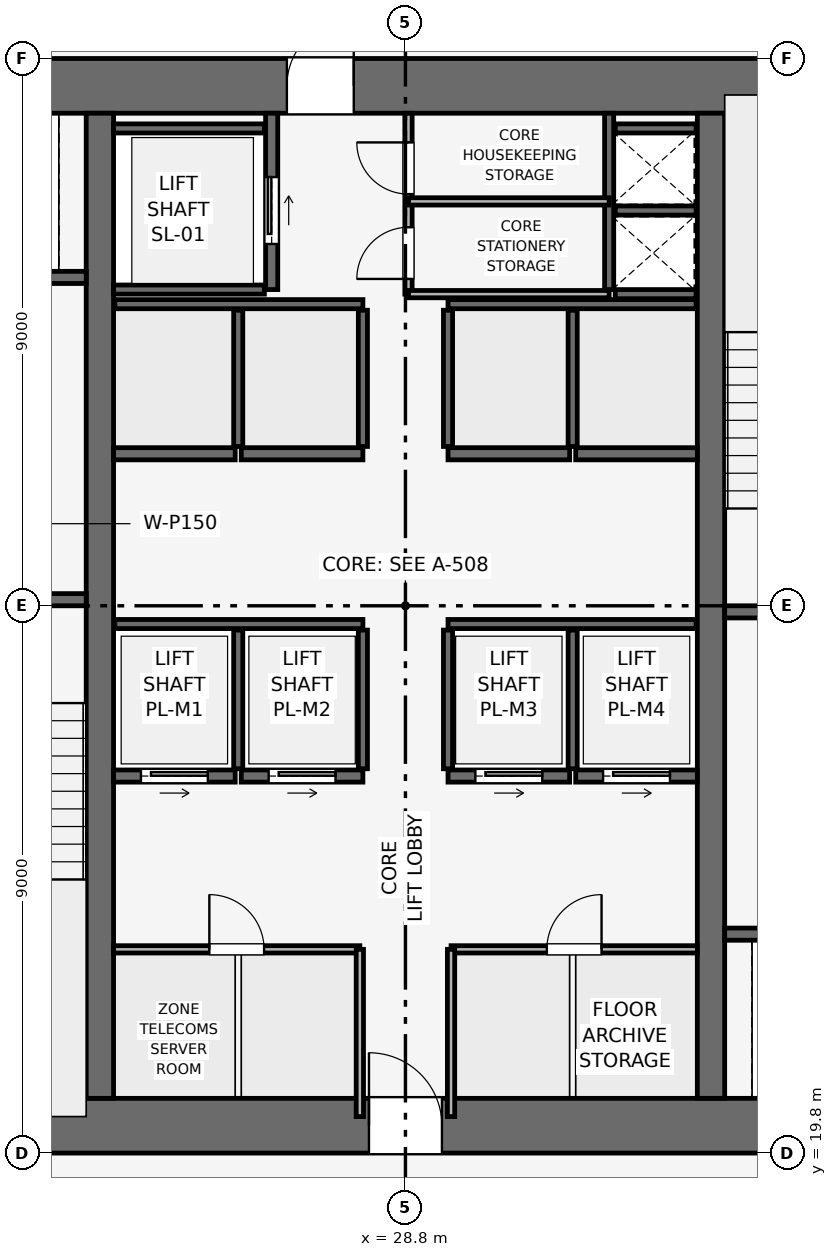
"""IFC4 building model, lengths in metres.
Left out: names, types, materials, properties, quantities, classifications, styles, units other than length and angle.
Written with IfcOpenShell. Run it as: python <this file> out.ifc"""

import sys

from ifc_helpers import new_model, si_unit, direction, frame, frame_2d, origin, place, context, subcontext, project, spatial, rectangle, extrude, element, fill, save


model = new_model("IFC4")
c1 = context("Model", 3, precision=1e-05, world=origin(), true_north=direction((0.0, 1.0)))
c2 = subcontext(c1, "Body", "Model", "MODEL_VIEW")
j1 = project(units=[si_unit("LENGTHUNIT", "METRE"), si_unit("PLANEANGLEUNIT", "RADIAN")], contexts=[c1])
p1 = place(None, origin())
s1 = spatial("IfcSite", under=j1, at=p1, CompositionType="ELEMENT")
p2 = place(p1, origin())
s2 = spatial("IfcBuilding", under=s1, at=p2, CompositionType="ELEMENT")
p3 = place(p2, frame((0.0, 0.0, 187.05)))
s3 = spatial("IfcBuildingStorey", under=s2, at=p3, CompositionType="ELEMENT", Elevation=187.05)
p4 = place(p3, frame((19.8, 20.25, 0.0), z_axis=(0.0, 0.0, 1.0), x_axis=(1.0, 0.0, 0.0)))
e1 = element("IfcWall", 1, at=p4, inside=s3, PredefinedType="SHEAR", context=c2, shape_type="SweptSolid", body=[
    extrude(rectangle(XDim=18.0, YDim=0.9, at=frame_2d((9.0, 0.0))), origin(), (0.0, 0.0, 1.0), 3.75),
])
p5 = place(p4, frame((8.4, 0.0, 0.0)))
e2 = element("IfcOpeningElement", 2, at=p5, cuts=e1, PredefinedType="OPENING", context=c2, shape_type="SweptSolid", body=[
    extrude(rectangle(XDim=1.2, YDim=2.2, at=frame_2d((0.6, 1.1))), frame((0.0, 0.46, 0.0), z_axis=(0.0, -1.0, 0.0), x_axis=(1.0, 0.0, 0.0)), (0.0, 0.0, 1.0), 0.92),
])
p6 = place(p3, frame((19.8, 37.35, 0.0), z_axis=(0.0, 0.0, 1.0), x_axis=(1.0, 0.0, 0.0)))
e3 = element("IfcWall", 3, at=p6, inside=s3, PredefinedType="SHEAR", context=c2, shape_type="SweptSolid", body=[
    extrude(rectangle(XDim=18.0, YDim=0.9, at=frame_2d((9.0, 0.0))), origin(), (0.0, 0.0, 1.0), 3.75),
])
p7 = place(p6, frame((7.05, 0.0, 0.0)))
e4 = element("IfcOpeningElement", 4, at=p7, cuts=e3, PredefinedType="OPENING", context=c2, shape_type="SweptSolid", body=[
    extrude(rectangle(XDim=1.1, YDim=2.15, at=frame_2d((0.55, 1.075))), frame((0.0, 0.46, 0.0), z_axis=(0.0, -1.0, 0.0), x_axis=(1.0, 0.0, 0.0)), (0.0, 0.0, 1.0), 0.92),
])
for number, where, z_axis, x_axis in (
    (5, (23.775, 20.7, 0.0), (0.0, 0.0, 1.0), (0.0, 1.0, 0.0)),
    (6, (33.825, 20.7, 0.0), (0.0, 0.0, 1.0), (0.0, 1.0, 0.0)),
):
    element("IfcWall", number, at=place(p3, frame(where, z_axis=z_axis, x_axis=x_axis)), inside=s3, PredefinedType="SHEAR", context=c2, shape_type="SweptSolid", body=[
        extrude(rectangle(XDim=16.2, YDim=0.45, at=frame_2d((8.1, 0.0))), origin(), (0.0, 0.0, 1.0), 3.75),
    ])
p8 = place(p3, frame((20.4, 28.9, 0.0), z_axis=(0.0, 0.0, 1.0), x_axis=(1.0, 0.0, 0.0)))
e7 = element("IfcWall", 7, at=p8, inside=s3, PredefinedType="SHEAR", context=c2, shape_type="SweptSolid", body=[
    extrude(rectangle(XDim=3.15, YDim=0.2, at=frame_2d((1.575, 0.0))), origin(), (0.0, 0.0, 1.0), 3.495),
])
p9 = place(p8, frame((0.8, 0.0, 0.0)))
e8 = element("IfcOpeningElement", 8, at=p9, cuts=e7, PredefinedType="OPENING", context=c2, shape_type="SweptSolid", body=[
    extrude(rectangle(XDim=1.0, YDim=2.1, at=frame_2d((0.5, 1.05))), frame((0.0, 0.11, 0.0), z_axis=(0.0, -1.0, 0.0), x_axis=(1.0, 0.0, 0.0)), (0.0, 0.0, 1.0), 0.22),
])
p10 = place(p3, frame((34.05, 28.7, 0.0), z_axis=(0.0, 0.0, 1.0), x_axis=(1.0, 0.0, 0.0)))
e9 = element("IfcWall", 9, at=p10, inside=s3, PredefinedType="SHEAR", context=c2, shape_type="SweptSolid", body=[
    extrude(rectangle(XDim=3.15, YDim=0.2, at=frame_2d((1.575, 0.0))), origin(), (0.0, 0.0, 1.0), 3.495),
])
p11 = place(p10, frame((0.8, 0.0, 0.0)))
e10 = element("IfcOpeningElement", 10, at=p11, cuts=e9, PredefinedType="OPENING", context=c2, shape_type="SweptSolid", body=[
    extrude(rectangle(XDim=1.0, YDim=2.1, at=frame_2d((0.5, 1.05))), frame((0.0, 0.11, 0.0), z_axis=(0.0, -1.0, 0.0), x_axis=(1.0, 0.0, 0.0)), (0.0, 0.0, 1.0), 0.22),
])
p12 = place(p3, frame((32.15, 34.0, 0.0), z_axis=(0.0, 0.0, 1.0), x_axis=(0.0, 1.0, 0.0)))
e11 = element("IfcWall", 11, at=p12, inside=s3, PredefinedType="SHEAR", context=c2, shape_type="SweptSolid", body=[
    extrude(rectangle(XDim=2.9, YDim=0.15, at=frame_2d((1.45, 0.0))), origin(), (0.0, 0.0, 1.0), 3.495),
])
for number, where, z_axis, x_axis in (
    (12, (32.25, 33.925, 0.0), (0.0, 0.0, 1.0), (1.0, 0.0, 0.0)),
    (13, (32.25, 35.3, 0.0), (0.0, 0.0, 1.0), (1.0, 0.0, 0.0)),
):
    element("IfcWall", number, at=place(p3, frame(where, z_axis=z_axis, x_axis=x_axis)), inside=s3, PredefinedType="SHEAR", context=c2, shape_type="SweptSolid", body=[
        extrude(rectangle(XDim=1.33, YDim=0.15, at=frame_2d((0.665, 0.0))), origin(), (0.0, 0.0, 1.0), 3.495),
    ])
p13 = place(p3, frame((20.5, 34.2, 0.0), z_axis=(0.0, 0.0, 1.0), x_axis=(1.0, 0.0, 0.0)))
e14 = element("IfcWall", 14, at=p13, inside=s3, PredefinedType="SHEAR", context=c2, shape_type="SweptSolid", body=[
    extrude(rectangle(XDim=3.05, YDim=0.2, at=frame_2d((1.525, 0.0))), origin(), (0.0, 0.0, 1.0), 3.495),
])
p14 = place(p13, frame((0.75, 0.0, 0.0)))
e15 = element("IfcOpeningElement", 15, at=p14, cuts=e14, PredefinedType="OPENING", context=c2, shape_type="SweptSolid", body=[
    extrude(rectangle(XDim=1.1, YDim=2.15, at=frame_2d((0.55, 1.075))), frame((0.0, 0.11, 0.0), z_axis=(0.0, -1.0, 0.0), x_axis=(1.0, 0.0, 0.0)), (0.0, 0.0, 1.0), 0.22),
])
p15 = place(p3, frame((34.05, 23.4, 0.0), z_axis=(0.0, 0.0, 1.0), x_axis=(1.0, 0.0, 0.0)))
e16 = element("IfcWall", 16, at=p15, inside=s3, PredefinedType="SHEAR", context=c2, shape_type="SweptSolid", body=[
    extrude(rectangle(XDim=3.05, YDim=0.2, at=frame_2d((1.525, 0.0))), origin(), (0.0, 0.0, 1.0), 3.495),
])
p16 = place(p15, frame((1.2, 0.0, 0.0)))
e17 = element("IfcOpeningElement", 17, at=p16, cuts=e16, PredefinedType="OPENING", context=c2, shape_type="SweptSolid", body=[
    extrude(rectangle(XDim=1.1, YDim=2.15, at=frame_2d((0.55, 1.075))), frame((0.0, 0.11, 0.0), z_axis=(0.0, -1.0, 0.0), x_axis=(1.0, 0.0, 0.0)), (0.0, 0.0, 1.0), 0.22),
])
p17 = place(p3, frame((26.6, 34.0, 0.0), z_axis=(0.0, 0.0, 1.0), x_axis=(0.0, 1.0, 0.0)))
e18 = element("IfcWall", 18, at=p17, inside=s3, PredefinedType="SHEAR", context=c2, shape_type="SweptSolid", body=[
    extrude(rectangle(XDim=2.9, YDim=0.2, at=frame_2d((1.45, 0.0))), origin(), (0.0, 0.0, 1.0), 3.495),
])
p18 = place(p17, frame((0.75, 0.0, 0.0)))
e19 = element("IfcOpeningElement", 19, at=p18, cuts=e18, PredefinedType="OPENING", context=c2, shape_type="SweptSolid", body=[
    extrude(rectangle(XDim=1.1, YDim=2.15, at=frame_2d((0.55, 1.075))), frame((0.0, 0.11, 0.0), z_axis=(0.0, -1.0, 0.0), x_axis=(1.0, 0.0, 0.0)), (0.0, 0.0, 1.0), 0.22),
])
for number, where, z_axis, x_axis in (
    (20, (24.0, 34.0, 0.0), (0.0, 0.0, 1.0), (1.0, 0.0, 0.0)),
    (21, (24.0, 36.65, 0.0), (0.0, 0.0, 1.0), (1.0, 0.0, 0.0)),
):
    element("IfcWall", number, at=place(p3, frame(where, z_axis=z_axis, x_axis=x_axis)), inside=s3, PredefinedType="SHEAR", context=c2, shape_type="SweptSolid", body=[
        extrude(rectangle(XDim=2.48, YDim=0.15, at=frame_2d((1.24, 0.0))), origin(), (0.0, 0.0, 1.0), 3.495),
    ])
p19 = place(p3, frame((24.0, 26.0, 0.0), z_axis=(0.0, 0.0, 1.0), x_axis=(1.0, 0.0, 0.0)))
e22 = element("IfcWall", 22, at=p19, inside=s3, PredefinedType="SHEAR", context=c2, shape_type="SweptSolid", body=[
    extrude(rectangle(XDim=2.0, YDim=0.2, at=frame_2d((1.0, 0.0))), origin(), (0.0, 0.0, 1.0), 3.495),
])
p20 = place(p19, frame((0.45, 0.0, 0.0)))
e23 = element("IfcOpeningElement", 23, at=p20, cuts=e22, PredefinedType="OPENING", context=c2, shape_type="SweptSolid", body=[
    extrude(rectangle(XDim=1.1, YDim=2.15, at=frame_2d((0.55, 1.075))), frame((0.0, 0.11, 0.0), z_axis=(0.0, -1.0, 0.0), x_axis=(1.0, 0.0, 0.0)), (0.0, 0.0, 1.0), 0.22),
])
p21 = place(p3, frame((26.1, 26.0, 0.0), z_axis=(0.0, 0.0, 1.0), x_axis=(1.0, 0.0, 0.0)))
e24 = element("IfcWall", 24, at=p21, inside=s3, PredefinedType="SHEAR", context=c2, shape_type="SweptSolid", body=[
    extrude(rectangle(XDim=2.0, YDim=0.2, at=frame_2d((1.0, 0.0))), origin(), (0.0, 0.0, 1.0), 3.495),
])
p22 = place(p21, frame((0.45, 0.0, 0.0)))
e25 = element("IfcOpeningElement", 25, at=p22, cuts=e24, PredefinedType="OPENING", context=c2, shape_type="SweptSolid", body=[
    extrude(rectangle(XDim=1.1, YDim=2.15, at=frame_2d((0.55, 1.075))), frame((0.0, 0.11, 0.0), z_axis=(0.0, -1.0, 0.0), x_axis=(1.0, 0.0, 0.0)), (0.0, 0.0, 1.0), 0.22),
])
p23 = place(p3, frame((29.5, 26.0, 0.0), z_axis=(0.0, 0.0, 1.0), x_axis=(1.0, 0.0, 0.0)))
e26 = element("IfcWall", 26, at=p23, inside=s3, PredefinedType="SHEAR", context=c2, shape_type="SweptSolid", body=[
    extrude(rectangle(XDim=2.0, YDim=0.2, at=frame_2d((1.0, 0.0))), origin(), (0.0, 0.0, 1.0), 3.495),
])
p24 = place(p23, frame((0.45, 0.0, 0.0)))
e27 = element("IfcOpeningElement", 27, at=p24, cuts=e26, PredefinedType="OPENING", context=c2, shape_type="SweptSolid", body=[
    extrude(rectangle(XDim=1.1, YDim=2.15, at=frame_2d((0.55, 1.075))), frame((0.0, 0.11, 0.0), z_axis=(0.0, -1.0, 0.0), x_axis=(1.0, 0.0, 0.0)), (0.0, 0.0, 1.0), 0.22),
])
p25 = place(p3, frame((31.6, 26.0, 0.0), z_axis=(0.0, 0.0, 1.0), x_axis=(1.0, 0.0, 0.0)))
e28 = element("IfcWall", 28, at=p25, inside=s3, PredefinedType="SHEAR", context=c2, shape_type="SweptSolid", body=[
    extrude(rectangle(XDim=2.0, YDim=0.2, at=frame_2d((1.0, 0.0))), origin(), (0.0, 0.0, 1.0), 3.495),
])
p26 = place(p25, frame((0.45, 0.0, 0.0)))
e29 = element("IfcOpeningElement", 29, at=p26, cuts=e28, PredefinedType="OPENING", context=c2, shape_type="SweptSolid", body=[
    extrude(rectangle(XDim=1.1, YDim=2.15, at=frame_2d((0.55, 1.075))), frame((0.0, 0.11, 0.0), z_axis=(0.0, -1.0, 0.0), x_axis=(1.0, 0.0, 0.0)), (0.0, 0.0, 1.0), 0.22),
])
for number, where, z_axis, x_axis in (
    (30, (24.0, 31.3, 0.0), (0.0, 0.0, 1.0), (1.0, 0.0, 0.0)),
    (31, (26.1, 31.3, 0.0), (0.0, 0.0, 1.0), (1.0, 0.0, 0.0)),
    (32, (29.5, 31.3, 0.0), (0.0, 0.0, 1.0), (1.0, 0.0, 0.0)),
    (33, (31.6, 31.3, 0.0), (0.0, 0.0, 1.0), (1.0, 0.0, 0.0)),
):
    element("IfcWall", number, at=place(p3, frame(where, z_axis=z_axis, x_axis=x_axis)), inside=s3, PredefinedType="SHEAR", context=c2, shape_type="SweptSolid", body=[
        extrude(rectangle(XDim=2.0, YDim=0.2, at=frame_2d((1.0, 0.0))), origin(), (0.0, 0.0, 1.0), 3.495),
    ])
p27 = place(p3, frame((32.25, 36.65, 0.0), z_axis=(0.0, 0.0, 1.0), x_axis=(1.0, 0.0, 0.0)))
e34 = element("IfcWall", 34, at=p27, inside=s3, PredefinedType="SHEAR", context=c2, shape_type="SweptSolid", body=[
    extrude(rectangle(XDim=1.33, YDim=0.15, at=frame_2d((0.665, 0.0))), origin(), (0.0, 0.0, 1.0), 3.495),
])
for number, where, z_axis, x_axis in (
    (35, (24.02, 28.5, 0.0), (0.0, 0.0, 1.0), (1.0, 0.0, 0.0)),
    (36, (29.5, 28.5, 0.0), (0.0, 0.0, 1.0), (1.0, 0.0, 0.0)),
):
    element("IfcWall", number, at=place(p3, frame(where, z_axis=z_axis, x_axis=x_axis)), inside=s3, PredefinedType="SHEAR", context=c2, shape_type="SweptSolid", body=[
        extrude(rectangle(XDim=4.08, YDim=0.15, at=frame_2d((2.04, 0.0))), origin(), (0.0, 0.0, 1.0), 3.495),
    ])
for number, where, z_axis, x_axis in (
    (37, (26.05, 26.12, 0.0), (0.0, 0.0, 1.0), (0.0, 1.0, 0.0)),
    (38, (28.1, 26.12, 0.0), (0.0, 0.0, 1.0), (0.0, 1.0, 0.0)),
    (39, (29.5, 26.12, 0.0), (0.0, 0.0, 1.0), (0.0, 1.0, 0.0)),
    (40, (31.55, 26.12, 0.0), (0.0, 0.0, 1.0), (0.0, 1.0, 0.0)),
):
    element("IfcWall", number, at=place(p3, frame(where, z_axis=z_axis, x_axis=x_axis)), inside=s3, PredefinedType="SHEAR", context=c2, shape_type="SweptSolid", body=[
        extrude(rectangle(XDim=2.28, YDim=0.15, at=frame_2d((1.14, 0.0))), origin(), (0.0, 0.0, 1.0), 3.495),
    ])
for number, where, z_axis, x_axis in (
    (41, (24.02, 33.76, 0.0), (0.0, 0.0, 1.0), (1.0, 0.0, 0.0)),
    (42, (29.5, 33.76, 0.0), (0.0, 0.0, 1.0), (1.0, 0.0, 0.0)),
):
    element("IfcWall", number, at=place(p3, frame(where, z_axis=z_axis, x_axis=x_axis)), inside=s3, PredefinedType="SHEAR", context=c2, shape_type="SweptSolid", body=[
        extrude(rectangle(XDim=4.08, YDim=0.15, at=frame_2d((2.04, 0.0))), origin(), (0.0, 0.0, 1.0), 3.495),
    ])
for number, where, z_axis, x_axis in (
    (43, (26.05, 31.42, 0.0), (0.0, 0.0, 1.0), (0.0, 1.0, 0.0)),
    (44, (28.1, 31.42, 0.0), (0.0, 0.0, 1.0), (0.0, 1.0, 0.0)),
    (45, (29.5, 31.42, 0.0), (0.0, 0.0, 1.0), (0.0, 1.0, 0.0)),
    (46, (31.55, 31.42, 0.0), (0.0, 0.0, 1.0), (0.0, 1.0, 0.0)),
):
    element("IfcWall", number, at=place(p3, frame(where, z_axis=z_axis, x_axis=x_axis)), inside=s3, PredefinedType="SHEAR", context=c2, shape_type="SweptSolid", body=[
        extrude(rectangle(XDim=2.24, YDim=0.15, at=frame_2d((1.12, 0.0))), origin(), (0.0, 0.0, 1.0), 3.495),
    ])
p28 = place(p3, frame((28.85, 33.925, 0.0), z_axis=(0.0, 0.0, 1.0), x_axis=(0.0, 1.0, 0.0)))
e47 = element("IfcWall", 47, at=p28, inside=s3, PredefinedType="PARTITIONING", context=c2, shape_type="SweptSolid", body=[
    extrude(rectangle(XDim=2.975, YDim=0.12, at=frame_2d((1.487, 0.0))), origin(), (0.0, 0.0, 1.0), 3.495),
])
p29 = place(p28, frame((0.25, 0.0, 0.0)))
e48 = element("IfcOpeningElement", 48, at=p29, cuts=e47, PredefinedType="OPENING", context=c2, shape_type="SweptSolid", body=[
    extrude(rectangle(XDim=0.85, YDim=2.1, at=frame_2d((0.425, 1.05))), frame((0.0, 0.07, 0.0), z_axis=(0.0, -1.0, 0.0), x_axis=(1.0, 0.0, 0.0)), (0.0, 0.0, 1.0), 0.14),
])
p30 = place(p28, frame((1.645, 0.0, 0.0)))
e49 = element("IfcOpeningElement", 49, at=p30, cuts=e47, PredefinedType="OPENING", context=c2, shape_type="SweptSolid", body=[
    extrude(rectangle(XDim=0.85, YDim=2.1, at=frame_2d((0.425, 1.05))), frame((0.0, 0.07, 0.0), z_axis=(0.0, -1.0, 0.0), x_axis=(1.0, 0.0, 0.0)), (0.0, 0.0, 1.0), 0.14),
])
for number, where, z_axis, x_axis in (
    (50, (28.85, 35.45, 0.0), (0.0, 0.0, 1.0), (1.0, 0.0, 0.0)),
    (51, (28.85, 33.925, 0.0), (0.0, 0.0, 1.0), (1.0, 0.0, 0.0)),
):
    element("IfcWall", number, at=place(p3, frame(where, z_axis=z_axis, x_axis=x_axis)), inside=s3, PredefinedType="PARTITIONING", context=c2, shape_type="SweptSolid", body=[
        extrude(rectangle(XDim=3.3, YDim=0.12, at=frame_2d((1.65, 0.0))), origin(), (0.0, 0.0, 1.0), 3.495),
    ])
p31 = place(p3, frame((24.0, 23.15, 0.0), z_axis=(0.0, 0.0, 1.0), x_axis=(1.0, 0.0, 0.0)))
e52 = element("IfcWall", 52, at=p31, inside=s3, PredefinedType="PARTITIONING", context=c2, shape_type="SweptSolid", body=[
    extrude(rectangle(XDim=4.05, YDim=0.12, at=frame_2d((2.025, 0.0))), origin(), (0.0, 0.0, 1.0), 3.495),
])
p32 = place(p31, frame((1.575, 0.0, 0.0)))
e53 = element("IfcOpeningElement", 53, at=p32, cuts=e52, PredefinedType="OPENING", context=c2, shape_type="SweptSolid", body=[
    extrude(rectangle(XDim=0.9, YDim=2.1, at=frame_2d((0.45, 1.05))), frame((0.0, 0.07, 0.0), z_axis=(0.0, -1.0, 0.0), x_axis=(1.0, 0.0, 0.0)), (0.0, 0.0, 1.0), 0.14),
])
p33 = place(p3, frame((28.05, 20.4, 0.0), z_axis=(0.0, 0.0, 1.0), x_axis=(0.0, 1.0, 0.0)))
e54 = element("IfcWall", 54, at=p33, inside=s3, PredefinedType="PARTITIONING", context=c2, shape_type="SweptSolid", body=[
    extrude(rectangle(XDim=2.75, YDim=0.12, at=frame_2d((1.375, 0.0))), origin(), (0.0, 0.0, 1.0), 3.495),
])
p34 = place(p3, frame((29.55, 23.15, 0.0), z_axis=(0.0, 0.0, 1.0), x_axis=(1.0, 0.0, 0.0)))
e55 = element("IfcWall", 55, at=p34, inside=s3, PredefinedType="PARTITIONING", context=c2, shape_type="SweptSolid", body=[
    extrude(rectangle(XDim=4.05, YDim=0.12, at=frame_2d((2.025, 0.0))), origin(), (0.0, 0.0, 1.0), 3.495),
])
p35 = place(p34, frame((1.575, 0.0, 0.0)))
e56 = element("IfcOpeningElement", 56, at=p35, cuts=e55, PredefinedType="OPENING", context=c2, shape_type="SweptSolid", body=[
    extrude(rectangle(XDim=0.9, YDim=2.1, at=frame_2d((0.45, 1.05))), frame((0.0, 0.07, 0.0), z_axis=(0.0, -1.0, 0.0), x_axis=(1.0, 0.0, 0.0)), (0.0, 0.0, 1.0), 0.14),
])
p36 = place(p3, frame((29.55, 20.4, 0.0), z_axis=(0.0, 0.0, 1.0), x_axis=(0.0, 1.0, 0.0)))
e57 = element("IfcWall", 57, at=p36, inside=s3, PredefinedType="PARTITIONING", context=c2, shape_type="SweptSolid", body=[
    extrude(rectangle(XDim=2.75, YDim=0.12, at=frame_2d((1.375, 0.0))), origin(), (0.0, 0.0, 1.0), 3.495),
])
p37 = place(p18, origin())
e58 = element("IfcDoor", 58, at=p37, inside=s3, OperationType="SLIDING_TO_RIGHT", PredefinedType="DOOR", context=c2, shape_type="SweptSolid", body=[
    extrude(rectangle(XDim=1.1, YDim=2.15, at=frame_2d((0.55, 1.075))), frame((0.0, 0.025, 0.0), z_axis=(0.0, -1.0, 0.0), x_axis=(1.0, 0.0, 0.0)), (0.0, 0.0, 1.0), 0.05),
])
fill(e19, e58)
p38 = place(p20, origin())
e59 = element("IfcDoor", 59, at=p38, inside=s3, OperationType="SLIDING_TO_RIGHT", PredefinedType="DOOR", context=c2, shape_type="SweptSolid", body=[
    extrude(rectangle(XDim=1.1, YDim=2.15, at=frame_2d((0.55, 1.075))), frame((0.0, 0.025, 0.0), z_axis=(0.0, -1.0, 0.0), x_axis=(1.0, 0.0, 0.0)), (0.0, 0.0, 1.0), 0.05),
])
fill(e23, e59)
p39 = place(p22, origin())
e60 = element("IfcDoor", 60, at=p39, inside=s3, OperationType="SLIDING_TO_RIGHT", PredefinedType="DOOR", context=c2, shape_type="SweptSolid", body=[
    extrude(rectangle(XDim=1.1, YDim=2.15, at=frame_2d((0.55, 1.075))), frame((0.0, 0.025, 0.0), z_axis=(0.0, -1.0, 0.0), x_axis=(1.0, 0.0, 0.0)), (0.0, 0.0, 1.0), 0.05),
])
fill(e25, e60)
p40 = place(p24, origin())
e61 = element("IfcDoor", 61, at=p40, inside=s3, OperationType="SLIDING_TO_RIGHT", PredefinedType="DOOR", context=c2, shape_type="SweptSolid", body=[
    extrude(rectangle(XDim=1.1, YDim=2.15, at=frame_2d((0.55, 1.075))), frame((0.0, 0.025, 0.0), z_axis=(0.0, -1.0, 0.0), x_axis=(1.0, 0.0, 0.0)), (0.0, 0.0, 1.0), 0.05),
])
fill(e27, e61)
p41 = place(p26, origin())
e62 = element("IfcDoor", 62, at=p41, inside=s3, OperationType="SLIDING_TO_RIGHT", PredefinedType="DOOR", context=c2, shape_type="SweptSolid", body=[
    extrude(rectangle(XDim=1.1, YDim=2.15, at=frame_2d((0.55, 1.075))), frame((0.0, 0.025, 0.0), z_axis=(0.0, -1.0, 0.0), x_axis=(1.0, 0.0, 0.0)), (0.0, 0.0, 1.0), 0.05),
])
fill(e29, e62)
p42 = place(p29, origin())
e63 = element("IfcDoor", 63, at=p42, inside=s3, OperationType="SINGLE_SWING_LEFT", PredefinedType="DOOR", context=c2, shape_type="SweptSolid", body=[
    extrude(rectangle(XDim=0.85, YDim=2.1, at=frame_2d((0.425, 1.05))), frame((0.0, 0.025, 0.0), z_axis=(0.0, -1.0, 0.0), x_axis=(1.0, 0.0, 0.0)), (0.0, 0.0, 1.0), 0.05),
])
fill(e48, e63)
p43 = place(p30, origin())
e64 = element("IfcDoor", 64, at=p43, inside=s3, OperationType="SINGLE_SWING_RIGHT", PredefinedType="DOOR", context=c2, shape_type="SweptSolid", body=[
    extrude(rectangle(XDim=0.85, YDim=2.1, at=frame_2d((0.425, 1.05))), frame((0.0, 0.025, 0.0), z_axis=(0.0, -1.0, 0.0), x_axis=(1.0, 0.0, 0.0)), (0.0, 0.0, 1.0), 0.05),
])
fill(e49, e64)
p44 = place(p32, origin())
e65 = element("IfcDoor", 65, at=p44, inside=s3, OperationType="SINGLE_SWING_LEFT", PredefinedType="DOOR", context=c2, shape_type="SweptSolid", body=[
    extrude(rectangle(XDim=0.9, YDim=2.1, at=frame_2d((0.45, 1.05))), frame((0.0, 0.025, 0.0), z_axis=(0.0, -1.0, 0.0), x_axis=(1.0, 0.0, 0.0)), (0.0, 0.0, 1.0), 0.05),
])
fill(e53, e65)
p45 = place(p35, origin())
e66 = element("IfcDoor", 66, at=p45, inside=s3, OperationType="SINGLE_SWING_RIGHT", PredefinedType="DOOR", context=c2, shape_type="SweptSolid", body=[
    extrude(rectangle(XDim=0.9, YDim=2.1, at=frame_2d((0.45, 1.05))), frame((0.0, 0.025, 0.0), z_axis=(0.0, -1.0, 0.0), x_axis=(1.0, 0.0, 0.0)), (0.0, 0.0, 1.0), 0.05),
])
fill(e56, e66)
p46 = place(p5, origin())
e67 = element("IfcDoor", 67, at=p46, inside=s3, OperationType="SINGLE_SWING_LEFT", PredefinedType="DOOR", context=c2, shape_type="SweptSolid", body=[
    extrude(rectangle(XDim=1.2, YDim=2.2, at=frame_2d((0.6, 1.1))), frame((0.0, 0.025, 0.0), z_axis=(0.0, -1.0, 0.0), x_axis=(1.0, 0.0, 0.0)), (0.0, 0.0, 1.0), 0.05),
])
fill(e2, e67)
p47 = place(p7, origin())
e68 = element("IfcDoor", 68, at=p47, inside=s3, OperationType="SINGLE_SWING_RIGHT", PredefinedType="DOOR", context=c2, shape_type="SweptSolid", body=[
    extrude(rectangle(XDim=1.1, YDim=2.15, at=frame_2d((0.55, 1.075))), frame((0.0, 0.025, 0.0), z_axis=(0.0, -1.0, 0.0), x_axis=(1.0, 0.0, 0.0)), (0.0, 0.0, 1.0), 0.05),
])
fill(e4, e68)
save(model, sys.argv[1])
